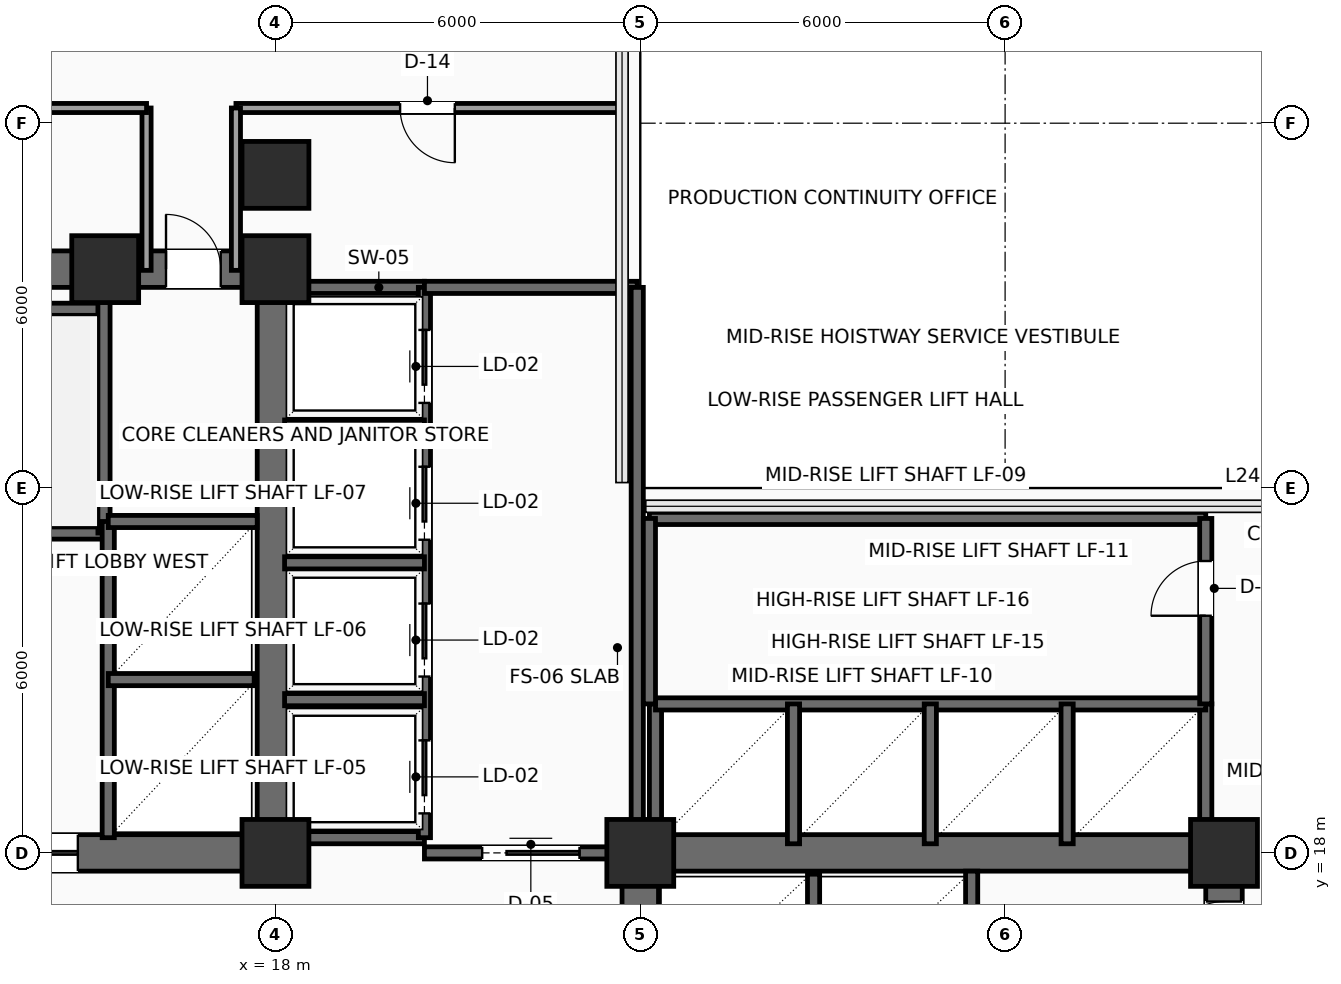
"""IFC4 building model, lengths in metres.
Left out: names, types, materials, properties, quantities, classifications, styles, units other than length and angle.
Written with IfcOpenShell. Run it as: python <this file> out.ifc"""

import sys

from ifc_helpers import new_model, si_unit, direction, frame, frame_2d, origin, origin_2d, place, context, subcontext, project, spatial, rectangle, extrude, element, fill, save


model = new_model("IFC4")
c1 = context("Model", 3, precision=1e-05, world=origin(), true_north=direction((0.0, 1.0)))
c2 = subcontext(c1, "Body", "Model", "MODEL_VIEW")
j1 = project(units=[si_unit("LENGTHUNIT", "METRE"), si_unit("PLANEANGLEUNIT", "RADIAN")], contexts=[c1])
p1 = place(None, origin())
s1 = spatial("IfcSite", under=j1, at=p1, CompositionType="ELEMENT")
p2 = place(p1, origin())
s2 = spatial("IfcBuilding", under=s1, at=p2, CompositionType="ELEMENT")
p3 = place(p2, frame((0.0, 0.0, 103.35)))
s3 = spatial("IfcBuildingStorey", under=s2, at=p3, CompositionType="ELEMENT", Elevation=103.35)
for number, where, z_axis, x_axis in (
    (1, (18.0, 18.0, 0.0), (0.0, 0.0, 1.0), (1.0, 0.0, 0.0)),
    (2, (15.2, 27.6, 0.0), (0.0, 0.0, 1.0), (1.0, 0.0, 0.0)),
    (3, (18.0, 27.6, 0.0), (0.0, 0.0, 1.0), (1.0, 0.0, 0.0)),
    (4, (24.0, 18.0, 0.0), (0.0, 0.0, 1.0), (1.0, 0.0, 0.0)),
    (5, (33.6, 18.0, 0.0), (0.0, 0.0, 1.0), (1.0, 0.0, 0.0)),
    (6, (18.0, 29.15, 0.0), (0.0, 0.0, 1.0), (1.0, 0.0, 0.0)),
):
    element("IfcColumn", number, at=place(p3, frame(where, z_axis=z_axis, x_axis=x_axis)), inside=s3, PredefinedType="COLUMN", context=c2, shape_type="SweptSolid", body=[
        extrude(rectangle(XDim=1.1, YDim=1.1, at=origin_2d()), origin(), (0.0, 0.0, 1.0), 3.75),
    ])
p4 = place(p3, frame((6.0, 18.0, 0.0), z_axis=(0.0, 0.0, 1.0), x_axis=(1.0, 0.0, 0.0)))
e7 = element("IfcWall", 7, at=p4, inside=s3, PredefinedType="SHEAR", context=c2, shape_type="SweptSolid", body=[
    extrude(rectangle(XDim=12.0, YDim=0.6, at=frame_2d((6.0, 0.0))), origin(), (0.0, 0.0, 1.0), 3.525),
])
p5 = place(p4, frame((7.15, 0.0, 0.0)))
e8 = element("IfcOpeningElement", 8, at=p5, cuts=e7, PredefinedType="OPENING", context=c2, shape_type="SweptSolid", body=[
    extrude(rectangle(XDim=1.6, YDim=2.3, at=frame_2d((0.8, 1.15))), frame((0.0, 0.31, 0.0), z_axis=(0.0, -1.0, 0.0), x_axis=(1.0, 0.0, 0.0)), (0.0, 0.0, 1.0), 0.62),
])
p6 = place(p3, frame((6.0, 27.6, 0.0), z_axis=(0.0, 0.0, 1.0), x_axis=(1.0, 0.0, 0.0)))
e9 = element("IfcWall", 9, at=p6, inside=s3, PredefinedType="SHEAR", context=c2, shape_type="SweptSolid", body=[
    extrude(rectangle(XDim=12.0, YDim=0.6, at=frame_2d((6.0, 0.0))), origin(), (0.0, 0.0, 1.0), 3.525),
])
p7 = place(p6, frame((10.2, 0.0, 0.0)))
e10 = element("IfcOpeningElement", 10, at=p7, cuts=e9, PredefinedType="OPENING", context=c2, shape_type="SweptSolid", body=[
    extrude(rectangle(XDim=0.9, YDim=2.15, at=frame_2d((0.45, 1.075))), frame((0.0, 0.31, 0.0), z_axis=(0.0, -1.0, 0.0), x_axis=(1.0, 0.0, 0.0)), (0.0, 0.0, 1.0), 0.62),
])
for number, where, z_axis, x_axis in (
    (11, (18.0, 18.0, 0.0), (0.0, 0.0, 1.0), (0.0, 1.0, 0.0)),
    (12, (24.0, 18.0, 0.0), (0.0, 0.0, 1.0), (1.0, 0.0, 0.0)),
):
    element("IfcWall", number, at=place(p3, frame(where, z_axis=z_axis, x_axis=x_axis)), inside=s3, PredefinedType="SHEAR", context=c2, shape_type="SweptSolid", body=[
        extrude(rectangle(XDim=9.6, YDim=0.6, at=frame_2d((4.8, 0.0))), origin(), (0.0, 0.0, 1.0), 3.525),
    ])
p8 = place(p3, frame((24.0, 6.0, 0.0), z_axis=(0.0, 0.0, 1.0), x_axis=(0.0, 1.0, 0.0)))
e13 = element("IfcWall", 13, at=p8, inside=s3, PredefinedType="SHEAR", context=c2, shape_type="SweptSolid", body=[
    extrude(rectangle(XDim=12.0, YDim=0.6, at=frame_2d((6.0, 0.0))), origin(), (0.0, 0.0, 1.0), 3.525),
])
p9 = place(p8, frame((7.15, 0.0, 0.0)))
e14 = element("IfcOpeningElement", 14, at=p9, cuts=e13, PredefinedType="OPENING", context=c2, shape_type="SweptSolid", body=[
    extrude(rectangle(XDim=1.6, YDim=2.3, at=frame_2d((0.8, 1.15))), frame((0.0, 0.31, 0.0), z_axis=(0.0, -1.0, 0.0), x_axis=(1.0, 0.0, 0.0)), (0.0, 0.0, 1.0), 0.62),
])
p10 = place(p3, frame((33.6, 6.0, 0.0), z_axis=(0.0, 0.0, 1.0), x_axis=(0.0, 1.0, 0.0)))
e15 = element("IfcWall", 15, at=p10, inside=s3, PredefinedType="SHEAR", context=c2, shape_type="SweptSolid", body=[
    extrude(rectangle(XDim=12.0, YDim=0.6, at=frame_2d((6.0, 0.0))), origin(), (0.0, 0.0, 1.0), 3.525),
])
p11 = place(p10, frame((10.3, 0.0, 0.0)))
e16 = element("IfcOpeningElement", 16, at=p11, cuts=e15, PredefinedType="OPENING", context=c2, shape_type="SweptSolid", body=[
    extrude(rectangle(XDim=0.9, YDim=2.15, at=frame_2d((0.45, 1.075))), frame((0.0, 0.31, 0.0), z_axis=(0.0, -1.0, 0.0), x_axis=(1.0, 0.0, 0.0)), (0.0, 0.0, 1.0), 0.62),
])
p12 = place(p3, frame((6.3, 23.26, 0.0), z_axis=(0.0, 0.0, 1.0), x_axis=(1.0, 0.0, 0.0)))
e17 = element("IfcWall", 17, at=p12, inside=s3, PredefinedType="SHEAR", context=c2, shape_type="SweptSolid", body=[
    extrude(rectangle(XDim=8.88, YDim=0.2, at=frame_2d((4.44, 0.0))), origin(), (0.0, 0.0, 1.0), 3.525),
])
p13 = place(p12, frame((0.35, 0.0, 0.0)))
e18 = element("IfcOpeningElement", 18, at=p13, cuts=e17, PredefinedType="OPENING", context=c2, shape_type="SweptSolid", body=[
    extrude(rectangle(XDim=1.1, YDim=2.2, at=frame_2d((0.55, 1.1))), frame((0.0, 0.11, 0.0), z_axis=(0.0, -1.0, 0.0), x_axis=(1.0, 0.0, 0.0)), (0.0, 0.0, 1.0), 0.22),
])
p14 = place(p3, frame((6.3, 26.94, 0.0), z_axis=(0.0, 0.0, 1.0), x_axis=(1.0, 0.0, 0.0)))
e19 = element("IfcWall", 19, at=p14, inside=s3, PredefinedType="SHEAR", context=c2, shape_type="SweptSolid", body=[
    extrude(rectangle(XDim=8.88, YDim=0.2, at=frame_2d((4.44, 0.0))), origin(), (0.0, 0.0, 1.0), 3.525),
])
p15 = place(p3, frame((15.18, 23.26, 0.0), z_axis=(0.0, 0.0, 1.0), x_axis=(0.0, 1.0, 0.0)))
e20 = element("IfcWall", 20, at=p15, inside=s3, PredefinedType="SHEAR", context=c2, shape_type="SweptSolid", body=[
    extrude(rectangle(XDim=4.04, YDim=0.2, at=frame_2d((2.02, 0.0))), origin(), (0.0, 0.0, 1.0), 3.525),
])
p16 = place(p3, frame((15.25, 18.25, 0.0), z_axis=(0.0, 0.0, 1.0), x_axis=(0.0, 1.0, 0.0)))
e21 = element("IfcWall", 21, at=p16, inside=s3, PredefinedType="SHEAR", context=c2, shape_type="SweptSolid", body=[
    extrude(rectangle(XDim=5.2, YDim=0.2, at=frame_2d((2.6, 0.0))), origin(), (0.0, 0.0, 1.0), 3.525),
])
p17 = place(p3, frame((15.25, 20.85, 0.0), z_axis=(0.0, 0.0, 1.0), x_axis=(1.0, 0.0, 0.0)))
e22 = element("IfcWall", 22, at=p17, inside=s3, PredefinedType="SHEAR", context=c2, shape_type="SweptSolid", body=[
    extrude(rectangle(XDim=2.4, YDim=0.2, at=frame_2d((1.2, 0.0))), origin(), (0.0, 0.0, 1.0), 3.525),
])
p18 = place(p3, frame((15.25, 23.45, 0.0), z_axis=(0.0, 0.0, 1.0), x_axis=(1.0, 0.0, 0.0)))
e23 = element("IfcWall", 23, at=p18, inside=s3, PredefinedType="SHEAR", context=c2, shape_type="SweptSolid", body=[
    extrude(rectangle(XDim=2.45, YDim=0.2, at=frame_2d((1.225, 0.0))), origin(), (0.0, 0.0, 1.0), 3.525),
])
p19 = place(p3, frame((26.85, 15.25, 0.0), z_axis=(0.0, 0.0, 1.0), x_axis=(0.0, 1.0, 0.0)))
e24 = element("IfcWall", 24, at=p19, inside=s3, PredefinedType="SHEAR", context=c2, shape_type="SweptSolid", body=[
    extrude(rectangle(XDim=2.4, YDim=0.2, at=frame_2d((1.2, 0.0))), origin(), (0.0, 0.0, 1.0), 3.525),
])
p20 = place(p3, frame((29.45, 15.25, 0.0), z_axis=(0.0, 0.0, 1.0), x_axis=(0.0, 1.0, 0.0)))
e25 = element("IfcWall", 25, at=p20, inside=s3, PredefinedType="SHEAR", context=c2, shape_type="SweptSolid", body=[
    extrude(rectangle(XDim=2.45, YDim=0.2, at=frame_2d((1.225, 0.0))), origin(), (0.0, 0.0, 1.0), 3.525),
])
for number, where, z_axis, x_axis in (
    (26, (18.1, 27.3, 0.0), (0.0, 0.0, 1.0), (1.0, 0.0, 0.0)),
    (27, (18.1, 18.25, 0.0), (0.0, 0.0, 1.0), (1.0, 0.0, 0.0)),
):
    element("IfcWall", number, at=place(p3, frame(where, z_axis=z_axis, x_axis=x_axis)), inside=s3, PredefinedType="SHEAR", context=c2, shape_type="SweptSolid", body=[
        extrude(rectangle(XDim=2.35, YDim=0.2, at=frame_2d((1.175, 0.0))), origin(), (0.0, 0.0, 1.0), 3.525),
    ])
p21 = place(p3, frame((20.45, 18.25, 0.0), z_axis=(0.0, 0.0, 1.0), x_axis=(0.0, 1.0, 0.0)))
e28 = element("IfcWall", 28, at=p21, inside=s3, PredefinedType="SHEAR", context=c2, shape_type="SweptSolid", body=[
    extrude(rectangle(XDim=9.05, YDim=0.2, at=frame_2d((4.525, 0.0))), origin(), (0.0, 0.0, 1.0), 3.525),
])
p22 = place(p21, frame((0.4, 0.0, 0.0)))
e29 = element("IfcOpeningElement", 29, at=p22, cuts=e28, PredefinedType="OPENING", context=c2, shape_type="SweptSolid", body=[
    extrude(rectangle(XDim=1.2, YDim=2.2, at=frame_2d((0.6, 1.1))), frame((0.0, 0.11, 0.0), z_axis=(0.0, -1.0, 0.0), x_axis=(1.0, 0.0, 0.0)), (0.0, 0.0, 1.0), 0.22),
])
p23 = place(p21, frame((2.65, 0.0, 0.0)))
e30 = element("IfcOpeningElement", 30, at=p23, cuts=e28, PredefinedType="OPENING", context=c2, shape_type="SweptSolid", body=[
    extrude(rectangle(XDim=1.2, YDim=2.2, at=frame_2d((0.6, 1.1))), frame((0.0, 0.11, 0.0), z_axis=(0.0, -1.0, 0.0), x_axis=(1.0, 0.0, 0.0)), (0.0, 0.0, 1.0), 0.22),
])
p24 = place(p21, frame((4.9, 0.0, 0.0)))
e31 = element("IfcOpeningElement", 31, at=p24, cuts=e28, PredefinedType="OPENING", context=c2, shape_type="SweptSolid", body=[
    extrude(rectangle(XDim=1.2, YDim=2.2, at=frame_2d((0.6, 1.1))), frame((0.0, 0.11, 0.0), z_axis=(0.0, -1.0, 0.0), x_axis=(1.0, 0.0, 0.0)), (0.0, 0.0, 1.0), 0.22),
])
p25 = place(p21, frame((7.15, 0.0, 0.0)))
e32 = element("IfcOpeningElement", 32, at=p25, cuts=e28, PredefinedType="OPENING", context=c2, shape_type="SweptSolid", body=[
    extrude(rectangle(XDim=1.2, YDim=2.2, at=frame_2d((0.6, 1.1))), frame((0.0, 0.11, 0.0), z_axis=(0.0, -1.0, 0.0), x_axis=(1.0, 0.0, 0.0)), (0.0, 0.0, 1.0), 0.22),
])
for number, where, z_axis, x_axis in (
    (33, (18.15, 20.52, 0.0), (0.0, 0.0, 1.0), (1.0, 0.0, 0.0)),
    (34, (18.15, 22.77, 0.0), (0.0, 0.0, 1.0), (1.0, 0.0, 0.0)),
    (35, (18.15, 25.02, 0.0), (0.0, 0.0, 1.0), (1.0, 0.0, 0.0)),
):
    element("IfcWall", number, at=place(p3, frame(where, z_axis=z_axis, x_axis=x_axis)), inside=s3, PredefinedType="SHEAR", context=c2, shape_type="SweptSolid", body=[
        extrude(rectangle(XDim=2.3, YDim=0.2, at=frame_2d((1.15, 0.0))), origin(), (0.0, 0.0, 1.0), 3.525),
    ])
p26 = place(p3, frame((20.45, 18.0, 0.0), z_axis=(0.0, 0.0, 1.0), x_axis=(1.0, 0.0, 0.0)))
e36 = element("IfcWall", 36, at=p26, inside=s3, PredefinedType="SHEAR", context=c2, shape_type="SweptSolid", body=[
    extrude(rectangle(XDim=3.5, YDim=0.2, at=frame_2d((1.75, 0.0))), origin(), (0.0, 0.0, 1.0), 3.525),
])
p27 = place(p26, frame((0.95, 0.0, 0.0)))
e37 = element("IfcOpeningElement", 37, at=p27, cuts=e36, PredefinedType="OPENING", context=c2, shape_type="SweptSolid", body=[
    extrude(rectangle(XDim=1.6, YDim=2.3, at=frame_2d((0.8, 1.15))), frame((0.0, 0.11, 0.0), z_axis=(0.0, -1.0, 0.0), x_axis=(1.0, 0.0, 0.0)), (0.0, 0.0, 1.0), 0.22),
])
p28 = place(p3, frame((20.45, 27.3, 0.0), z_axis=(0.0, 0.0, 1.0), x_axis=(1.0, 0.0, 0.0)))
e38 = element("IfcWall", 38, at=p28, inside=s3, PredefinedType="SHEAR", context=c2, shape_type="SweptSolid", body=[
    extrude(rectangle(XDim=3.5, YDim=0.2, at=frame_2d((1.75, 0.0))), origin(), (0.0, 0.0, 1.0), 3.525),
])
p29 = place(p3, frame((23.95, 18.0, 0.0), z_axis=(0.0, 0.0, 1.0), x_axis=(0.0, 1.0, 0.0)))
e39 = element("IfcWall", 39, at=p29, inside=s3, PredefinedType="SHEAR", context=c2, shape_type="SweptSolid", body=[
    extrude(rectangle(XDim=9.3, YDim=0.2, at=frame_2d((4.65, 0.0))), origin(), (0.0, 0.0, 1.0), 3.525),
])
for number, where, z_axis, x_axis in (
    (40, (33.3, 18.1, 0.0), (0.0, 0.0, 1.0), (0.0, 1.0, 0.0)),
    (41, (24.25, 18.1, 0.0), (0.0, 0.0, 1.0), (0.0, 1.0, 0.0)),
):
    element("IfcWall", number, at=place(p3, frame(where, z_axis=z_axis, x_axis=x_axis)), inside=s3, PredefinedType="SHEAR", context=c2, shape_type="SweptSolid", body=[
        extrude(rectangle(XDim=2.35, YDim=0.2, at=frame_2d((1.175, 0.0))), origin(), (0.0, 0.0, 1.0), 3.525),
    ])
p30 = place(p3, frame((24.25, 20.45, 0.0), z_axis=(0.0, 0.0, 1.0), x_axis=(1.0, 0.0, 0.0)))
e42 = element("IfcWall", 42, at=p30, inside=s3, PredefinedType="SHEAR", context=c2, shape_type="SweptSolid", body=[
    extrude(rectangle(XDim=9.05, YDim=0.2, at=frame_2d((4.525, 0.0))), origin(), (0.0, 0.0, 1.0), 3.525),
])
for number, where, z_axis, x_axis in (
    (43, (26.52, 18.15, 0.0), (0.0, 0.0, 1.0), (0.0, 1.0, 0.0)),
    (44, (28.77, 18.15, 0.0), (0.0, 0.0, 1.0), (0.0, 1.0, 0.0)),
    (45, (31.02, 18.15, 0.0), (0.0, 0.0, 1.0), (0.0, 1.0, 0.0)),
):
    element("IfcWall", number, at=place(p3, frame(where, z_axis=z_axis, x_axis=x_axis)), inside=s3, PredefinedType="SHEAR", context=c2, shape_type="SweptSolid", body=[
        extrude(rectangle(XDim=2.3, YDim=0.2, at=frame_2d((1.15, 0.0))), origin(), (0.0, 0.0, 1.0), 3.525),
    ])
p31 = place(p3, frame((24.15, 23.5, 0.0), z_axis=(0.0, 0.0, 1.0), x_axis=(1.0, 0.0, 0.0)))
e46 = element("IfcWall", 46, at=p31, inside=s3, PredefinedType="SHEAR", context=c2, shape_type="SweptSolid", body=[
    extrude(rectangle(XDim=9.15, YDim=0.2, at=frame_2d((4.575, 0.0))), origin(), (0.0, 0.0, 1.0), 3.525),
])
p32 = place(p3, frame((33.3, 20.45, 0.0), z_axis=(0.0, 0.0, 1.0), x_axis=(0.0, 1.0, 0.0)))
e47 = element("IfcWall", 47, at=p32, inside=s3, PredefinedType="SHEAR", context=c2, shape_type="SweptSolid", body=[
    extrude(rectangle(XDim=3.05, YDim=0.2, at=frame_2d((1.525, 0.0))), origin(), (0.0, 0.0, 1.0), 3.525),
])
p33 = place(p32, frame((1.45, 0.0, 0.0)))
e48 = element("IfcOpeningElement", 48, at=p33, cuts=e47, PredefinedType="OPENING", context=c2, shape_type="SweptSolid", body=[
    extrude(rectangle(XDim=0.9, YDim=2.15, at=frame_2d((0.45, 1.075))), frame((0.0, 0.11, 0.0), z_axis=(0.0, -1.0, 0.0), x_axis=(1.0, 0.0, 0.0)), (0.0, 0.0, 1.0), 0.22),
])
p34 = place(p3, frame((24.15, 20.45, 0.0), z_axis=(0.0, 0.0, 1.0), x_axis=(0.0, 1.0, 0.0)))
e49 = element("IfcWall", 49, at=p34, inside=s3, PredefinedType="SHEAR", context=c2, shape_type="SweptSolid", body=[
    extrude(rectangle(XDim=3.05, YDim=0.2, at=frame_2d((1.525, 0.0))), origin(), (0.0, 0.0, 1.0), 3.525),
])
p35 = place(p3, frame((23.7, 30.25, 0.0), z_axis=(0.0, 0.0, 1.0), x_axis=(-1.0, 0.0, 0.0)))
e50 = element("IfcWall", 50, at=p35, inside=s3, PredefinedType="PARTITIONING", context=c2, shape_type="SweptSolid", body=[
    extrude(rectangle(XDim=6.35, YDim=0.15, at=frame_2d((3.175, 0.0))), origin(), (0.0, 0.0, 1.0), 3.525),
])
p36 = place(p35, frame((2.75, 0.0, 0.0)))
e51 = element("IfcOpeningElement", 51, at=p36, cuts=e50, PredefinedType="OPENING", context=c2, shape_type="SweptSolid", body=[
    extrude(rectangle(XDim=0.9, YDim=2.1, at=frame_2d((0.45, 1.05))), frame((0.0, 0.085, 0.0), z_axis=(0.0, -1.0, 0.0), x_axis=(1.0, 0.0, 0.0)), (0.0, 0.0, 1.0), 0.17),
])
for number, where, z_axis, x_axis in (
    (52, (17.35, 30.25, 0.0), (0.0, 0.0, 1.0), (0.0, -1.0, 0.0)),
    (53, (15.88, 27.58, 0.0), (0.0, 0.0, 1.0), (0.0, 1.0, 0.0)),
):
    element("IfcWall", number, at=place(p3, frame(where, z_axis=z_axis, x_axis=x_axis)), inside=s3, PredefinedType="PARTITIONING", context=c2, shape_type="SweptSolid", body=[
        extrude(rectangle(XDim=2.67, YDim=0.15, at=frame_2d((1.335, 0.0))), origin(), (0.0, 0.0, 1.0), 3.525),
    ])
p37 = place(p3, frame((15.88, 30.25, 0.0), z_axis=(0.0, 0.0, 1.0), x_axis=(-1.0, 0.0, 0.0)))
e54 = element("IfcWall", 54, at=p37, inside=s3, PredefinedType="PARTITIONING", context=c2, shape_type="SweptSolid", body=[
    extrude(rectangle(XDim=10.63, YDim=0.15, at=frame_2d((5.315, 0.0))), origin(), (0.0, 0.0, 1.0), 3.525),
])
p38 = place(p37, frame((6.13, 0.0, 0.0)))
e55 = element("IfcOpeningElement", 55, at=p38, cuts=e54, PredefinedType="OPENING", context=c2, shape_type="SweptSolid", body=[
    extrude(rectangle(XDim=0.9, YDim=2.1, at=frame_2d((0.45, 1.05))), frame((0.0, 0.085, 0.0), z_axis=(0.0, -1.0, 0.0), x_axis=(1.0, 0.0, 0.0)), (0.0, 0.0, 1.0), 0.17),
])
p39 = place(p5, origin())
e56 = element("IfcDoor", 56, at=p39, inside=s3, OperationType="DOUBLE_DOOR_SLIDING", PredefinedType="DOOR", context=c2, shape_type="SweptSolid", body=[
    extrude(rectangle(XDim=1.6, YDim=2.3, at=frame_2d((0.8, 1.15))), frame((0.0, 0.025, 0.0), z_axis=(0.0, -1.0, 0.0), x_axis=(1.0, 0.0, 0.0)), (0.0, 0.0, 1.0), 0.05),
])
fill(e8, e56)
p40 = place(p7, origin())
e57 = element("IfcDoor", 57, at=p40, inside=s3, OperationType="SINGLE_SWING_LEFT", PredefinedType="DOOR", context=c2, shape_type="SweptSolid", body=[
    extrude(rectangle(XDim=0.9, YDim=2.15, at=frame_2d((0.45, 1.075))), frame((0.0, 0.025, 0.0), z_axis=(0.0, -1.0, 0.0), x_axis=(1.0, 0.0, 0.0)), (0.0, 0.0, 1.0), 0.05),
])
fill(e10, e57)
p41 = place(p11, origin())
e58 = element("IfcDoor", 58, at=p41, inside=s3, OperationType="SINGLE_SWING_LEFT", PredefinedType="DOOR", context=c2, shape_type="SweptSolid", body=[
    extrude(rectangle(XDim=0.9, YDim=2.15, at=frame_2d((0.45, 1.075))), frame((0.0, 0.025, 0.0), z_axis=(0.0, -1.0, 0.0), x_axis=(1.0, 0.0, 0.0)), (0.0, 0.0, 1.0), 0.05),
])
fill(e16, e58)
p42 = place(p22, origin())
e59 = element("IfcDoor", 59, at=p42, inside=s3, OperationType="SLIDING_TO_RIGHT", PredefinedType="DOOR", context=c2, shape_type="SweptSolid", body=[
    extrude(rectangle(XDim=1.2, YDim=2.2, at=frame_2d((0.6, 1.1))), frame((0.0, 0.025, 0.0), z_axis=(0.0, -1.0, 0.0), x_axis=(1.0, 0.0, 0.0)), (0.0, 0.0, 1.0), 0.05),
])
fill(e29, e59)
p43 = place(p23, origin())
e60 = element("IfcDoor", 60, at=p43, inside=s3, OperationType="SLIDING_TO_RIGHT", PredefinedType="DOOR", context=c2, shape_type="SweptSolid", body=[
    extrude(rectangle(XDim=1.2, YDim=2.2, at=frame_2d((0.6, 1.1))), frame((0.0, 0.025, 0.0), z_axis=(0.0, -1.0, 0.0), x_axis=(1.0, 0.0, 0.0)), (0.0, 0.0, 1.0), 0.05),
])
fill(e30, e60)
p44 = place(p24, origin())
e61 = element("IfcDoor", 61, at=p44, inside=s3, OperationType="SLIDING_TO_RIGHT", PredefinedType="DOOR", context=c2, shape_type="SweptSolid", body=[
    extrude(rectangle(XDim=1.2, YDim=2.2, at=frame_2d((0.6, 1.1))), frame((0.0, 0.025, 0.0), z_axis=(0.0, -1.0, 0.0), x_axis=(1.0, 0.0, 0.0)), (0.0, 0.0, 1.0), 0.05),
])
fill(e31, e61)
p45 = place(p25, origin())
e62 = element("IfcDoor", 62, at=p45, inside=s3, OperationType="SLIDING_TO_RIGHT", PredefinedType="DOOR", context=c2, shape_type="SweptSolid", body=[
    extrude(rectangle(XDim=1.2, YDim=2.2, at=frame_2d((0.6, 1.1))), frame((0.0, 0.025, 0.0), z_axis=(0.0, -1.0, 0.0), x_axis=(1.0, 0.0, 0.0)), (0.0, 0.0, 1.0), 0.05),
])
fill(e32, e62)
p46 = place(p27, origin())
e63 = element("IfcDoor", 63, at=p46, inside=s3, OperationType="DOUBLE_DOOR_SLIDING", PredefinedType="DOOR", context=c2, shape_type="SweptSolid", body=[
    extrude(rectangle(XDim=1.6, YDim=2.3, at=frame_2d((0.8, 1.15))), frame((0.0, 0.025, 0.0), z_axis=(0.0, -1.0, 0.0), x_axis=(1.0, 0.0, 0.0)), (0.0, 0.0, 1.0), 0.05),
])
fill(e37, e63)
p47 = place(p33, origin())
e64 = element("IfcDoor", 64, at=p47, inside=s3, OperationType="SINGLE_SWING_LEFT", PredefinedType="DOOR", context=c2, shape_type="SweptSolid", body=[
    extrude(rectangle(XDim=0.9, YDim=2.15, at=frame_2d((0.45, 1.075))), frame((0.0, 0.025, 0.0), z_axis=(0.0, -1.0, 0.0), x_axis=(1.0, 0.0, 0.0)), (0.0, 0.0, 1.0), 0.05),
])
fill(e48, e64)
p48 = place(p36, origin())
e65 = element("IfcDoor", 65, at=p48, inside=s3, OperationType="SINGLE_SWING_LEFT", PredefinedType="DOOR", context=c2, shape_type="SweptSolid", body=[
    extrude(rectangle(XDim=0.9, YDim=2.1, at=frame_2d((0.45, 1.05))), frame((0.0, 0.025, 0.0), z_axis=(0.0, -1.0, 0.0), x_axis=(1.0, 0.0, 0.0)), (0.0, 0.0, 1.0), 0.05),
])
fill(e51, e65)
save(model, sys.argv[1])
